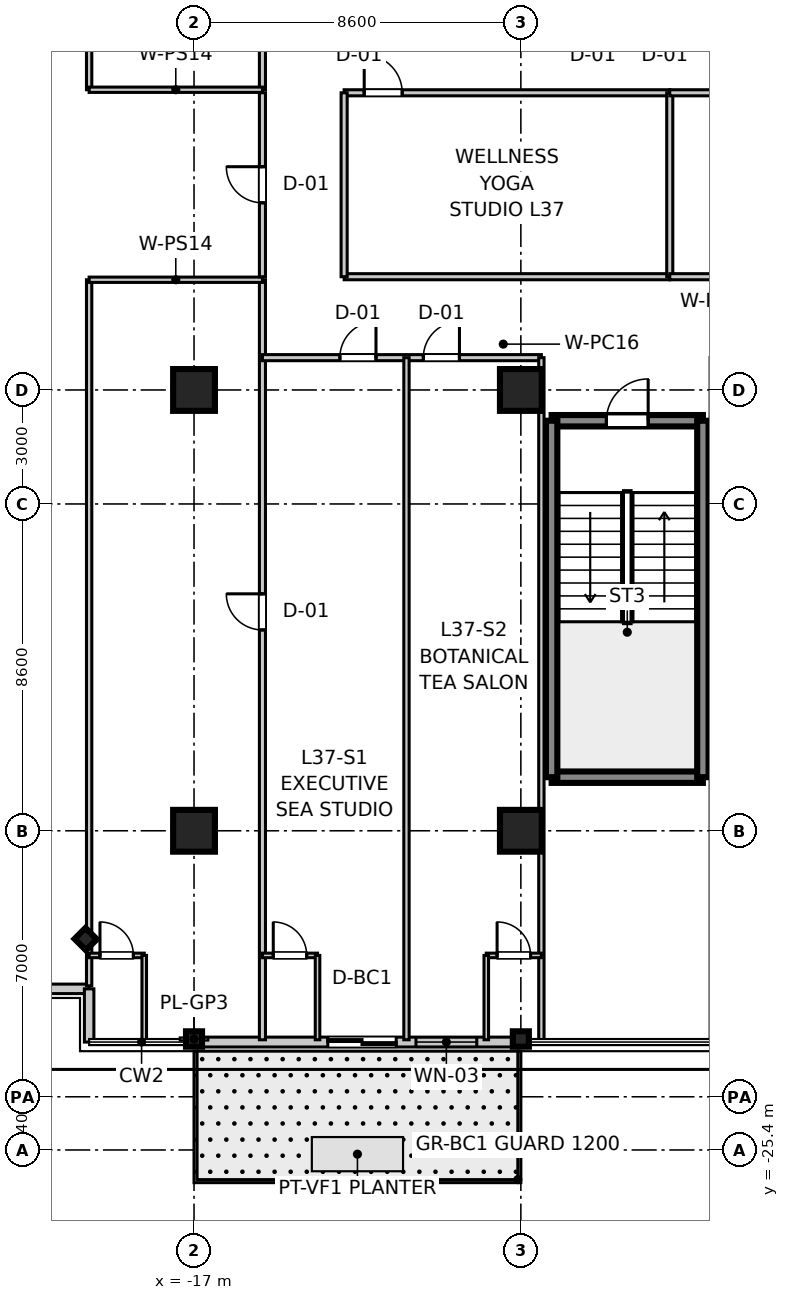
"""IFC4 building model, lengths in metres.
Left out: names, types, materials, properties, quantities, classifications, styles, units other than length and angle.
Written with IfcOpenShell. Run it as: python <this file> out.ifc"""

import sys

from ifc_helpers import new_model, si_unit, direction, frame, frame_2d, origin, origin_2d, place, context, subcontext, project, spatial, rectangle, i_section, extrude, source, transform, mapped, element, fill, save


model = new_model("IFC4")
c1 = context("Model", 3, precision=1e-05, world=origin(), true_north=direction((0.0, 1.0)))
c2 = subcontext(c1, "Body", "Model", "MODEL_VIEW")
j1 = project(units=[si_unit("LENGTHUNIT", "METRE"), si_unit("PLANEANGLEUNIT", "RADIAN")], contexts=[c1])
p1 = place(None, origin())
s1 = spatial("IfcSite", under=j1, at=p1, CompositionType="ELEMENT")
p2 = place(p1, origin())
s2 = spatial("IfcBuilding", under=s1, at=p2, CompositionType="ELEMENT")
p3 = place(p2, frame((0.0, 0.0, 149.0)))
s3 = spatial("IfcBuildingStorey", under=s2, at=p3, CompositionType="ELEMENT", Elevation=149.0)
m1 = source(origin(), c2, "Body", "SweptSolid", [
    extrude(rectangle(XDim=1.1, YDim=1.1, at=origin_2d()), origin(), (0.0, 0.0, 1.0), 3.605),
])
for number, where, z_axis, x_axis in (
    (1, (-17.0, -17.0, 0.0), (0.0, 0.0, 1.0), (1.0, 0.0, 0.0)),
    (2, (-17.0, -5.4, 0.0), (0.0, 0.0, 1.0), (1.0, 0.0, 0.0)),
    (3, (-8.4, -17.0, 0.0), (0.0, 0.0, 1.0), (1.0, 0.0, 0.0)),
    (4, (-8.4, -5.4, 0.0), (0.0, 0.0, 1.0), (1.0, 0.0, 0.0)),
):
    element("IfcColumn", number, at=place(p3, frame(where, z_axis=z_axis, x_axis=x_axis)), inside=s3, PredefinedType="COLUMN", context=c2, shape_type="MappedRepresentation", body=[
        mapped(m1, transform((0.0, 0.0, 0.0), scale=1.0)),
    ])
m2 = source(origin(), c2, "Body", "SweptSolid", [
    extrude(i_section(OverallWidth=0.406, OverallDepth=0.422, WebThickness=0.019, FlangeThickness=0.03, at=origin_2d()), origin(), (0.0, 0.0, 1.0), 3.605),
])
for number, where, z_axis, x_axis in (
    (5, (-17.0, -22.48, 0.0), (0.0, 0.0, 1.0), (0.0, 1.0, 0.0)),
    (6, (-8.4, -22.48, 0.0), (0.0, 0.0, 1.0), (0.0, 1.0, 0.0)),
    (7, (-19.85, -19.85, 0.0), (0.0, 0.0, 1.0), (0.707, 0.707, 0.0)),
):
    element("IfcColumn", number, at=place(p3, frame(where, z_axis=z_axis, x_axis=x_axis)), inside=s3, PredefinedType="COLUMN", context=c2, shape_type="MappedRepresentation", body=[
        mapped(m2, transform((0.0, 0.0, 0.0), scale=1.0)),
    ])
m3 = source(origin(), c2, "Body", "SweptSolid", [
    extrude(rectangle(XDim=3.98, YDim=0.3, at=frame_2d((1.99, 0.0))), origin(), (0.0, 0.0, 1.0), 3.39),
])
p4 = place(p3, frame((-7.59, -15.59, 0.0), z_axis=(0.0, 0.0, 1.0), x_axis=(1.0, 0.0, 0.0)))
e8 = element("IfcWall", 8, at=p4, inside=s3, PredefinedType="SHEAR", context=c2, shape_type="MappedRepresentation", body=[
    mapped(m3, transform((0.0, 0.0, 0.0), scale=1.0)),
])
p5 = place(p3, frame((-7.59, -6.21, 0.0), z_axis=(0.0, 0.0, 1.0), x_axis=(1.0, 0.0, 0.0)))
e9 = element("IfcWall", 9, at=p5, inside=s3, PredefinedType="SHEAR", context=c2, shape_type="MappedRepresentation", body=[
    mapped(m3, transform((0.0, 0.0, 0.0), scale=1.0)),
])
p6 = place(p5, frame((1.44, 0.0, 0.0)))
e10 = element("IfcOpeningElement", 10, at=p6, cuts=e9, PredefinedType="OPENING", context=c2, shape_type="SweptSolid", body=[
    extrude(rectangle(XDim=1.1, YDim=2.15, at=frame_2d((0.55, 1.075))), frame((0.0, 0.16, 0.0), z_axis=(0.0, -1.0, 0.0), x_axis=(1.0, 0.0, 0.0)), (0.0, 0.0, 1.0), 0.32),
])
m4 = source(origin(), c2, "Body", "SweptSolid", [
    extrude(rectangle(XDim=9.38, YDim=0.3, at=frame_2d((4.69, 0.0))), origin(), (0.0, 0.0, 1.0), 3.39),
])
for number, where, z_axis, x_axis in (
    (11, (-7.59, -15.59, 0.0), (0.0, 0.0, 1.0), (0.0, 1.0, 0.0)),
    (12, (-3.61, -15.59, 0.0), (0.0, 0.0, 1.0), (0.0, 1.0, 0.0)),
):
    element("IfcWall", number, at=place(p3, frame(where, z_axis=z_axis, x_axis=x_axis)), inside=s3, PredefinedType="SHEAR", context=c2, shape_type="MappedRepresentation", body=[
        mapped(m4, transform((0.0, 0.0, 0.0), scale=1.0)),
    ])
m5 = source(origin(), c2, "Body", "SweptSolid", [
    extrude(rectangle(XDim=1.4, YDim=0.25, at=frame_2d((0.7, 0.0))), origin(), (0.0, 0.0, 1.0), 3.39),
])
p7 = place(p3, frame((-21.16, -21.16, 0.0), z_axis=(0.0, 0.0, 1.0), x_axis=(1.0, 0.0, 0.0)))
e13 = element("IfcWall", 13, at=p7, inside=s3, PredefinedType="STANDARD", context=c2, shape_type="MappedRepresentation", body=[
    mapped(m5, transform((0.0, 0.0, 0.0), scale=1.0)),
])
m6 = source(origin(), c2, "Body", "SweptSolid", [
    extrude(rectangle(XDim=1.4, YDim=0.25, at=frame_2d((0.7, 0.0))), origin(), (0.0, 0.0, 1.0), 3.39),
])
p8 = place(p3, frame((-19.76, -22.56, 0.0), z_axis=(0.0, 0.0, 1.0), x_axis=(0.0, 1.0, 0.0)))
e14 = element("IfcWall", 14, at=p8, inside=s3, PredefinedType="STANDARD", context=c2, shape_type="MappedRepresentation", body=[
    mapped(m6, transform((0.0, 0.0, 0.0), scale=1.0)),
])
m7 = source(origin(), c2, "Body", "SweptSolid", [
    extrude(rectangle(XDim=8.6, YDim=0.26, at=frame_2d((4.3, 0.0))), origin(), (0.0, 0.0, 1.0), 2.87),
])
p9 = place(p3, frame((-17.0, -22.56, 0.0), z_axis=(0.0, 0.0, 1.0), x_axis=(1.0, 0.0, 0.0)))
e15 = element("IfcWall", 15, at=p9, inside=s3, PredefinedType="STANDARD", context=c2, shape_type="MappedRepresentation", body=[
    mapped(m7, transform((0.0, 0.0, 0.0), scale=1.0)),
])
p10 = place(p9, frame((3.52, 0.0, 0.0)))
e16 = element("IfcOpeningElement", 16, at=p10, cuts=e15, PredefinedType="OPENING", context=c2, shape_type="SweptSolid", body=[
    extrude(rectangle(XDim=1.8, YDim=2.25, at=frame_2d((0.9, 1.125))), frame((0.0, 0.14, 0.0), z_axis=(0.0, -1.0, 0.0), x_axis=(1.0, 0.0, 0.0)), (0.0, 0.0, 1.0), 0.28),
])
p11 = place(p9, frame((5.84, 0.0, 0.85)))
e17 = element("IfcOpeningElement", 17, at=p11, cuts=e15, PredefinedType="OPENING", context=c2, shape_type="SweptSolid", body=[
    extrude(rectangle(XDim=1.6, YDim=1.8, at=frame_2d((0.8, 0.9))), frame((0.0, 0.14, 0.0), z_axis=(0.0, -1.0, 0.0), x_axis=(1.0, 0.0, 0.0)), (0.0, 0.0, 1.0), 0.28),
])
m8 = source(origin(), c2, "Body", "SweptSolid", [
    extrude(rectangle(XDim=20.0, YDim=0.16, at=frame_2d((10.0, 0.0))), origin(), (0.0, 0.0, 1.0), 2.73),
])
p12 = place(p3, frame((-15.2, 2.5, 0.0), z_axis=(0.0, 0.0, 1.0), x_axis=(0.0, 1.0, 0.0)))
e18 = element("IfcWall", 18, at=p12, inside=s3, PredefinedType="PARTITIONING", context=c2, shape_type="MappedRepresentation", body=[
    mapped(m8, transform((0.0, 0.0, 0.0), scale=1.0)),
])
p13 = place(p12, frame((8.265, 0.0, 0.0)))
e19 = element("IfcOpeningElement", 19, at=p13, cuts=e18, PredefinedType="OPENING", context=c2, shape_type="SweptSolid", body=[
    extrude(rectangle(XDim=0.95, YDim=2.1, at=frame_2d((0.475, 1.05))), frame((0.0, 0.09, 0.0), z_axis=(0.0, -1.0, 0.0), x_axis=(1.0, 0.0, 0.0)), (0.0, 0.0, 1.0), 0.18),
])
m9 = source(origin(), c2, "Body", "SweptSolid", [
    extrude(rectangle(XDim=18.58, YDim=0.14, at=frame_2d((9.29, 0.0))), origin(), (0.0, 0.0, 1.0), 2.73),
])
p14 = place(p3, frame((-19.76, 2.5, 0.0), z_axis=(0.0, 0.0, 1.0), x_axis=(0.0, 1.0, 0.0)))
e20 = element("IfcWall", 20, at=p14, inside=s3, PredefinedType="PARTITIONING", context=c2, shape_type="MappedRepresentation", body=[
    mapped(m9, transform((0.0, 0.0, 0.0), scale=1.0)),
])
m10 = source(origin(), c2, "Body", "SweptSolid", [
    extrude(rectangle(XDim=4.56, YDim=0.14, at=frame_2d((2.28, 0.0))), origin(), (0.0, 0.0, 1.0), 2.73),
])
p15 = place(p3, frame((-19.76, 2.5, 0.0), z_axis=(0.0, 0.0, 1.0), x_axis=(1.0, 0.0, 0.0)))
e21 = element("IfcWall", 21, at=p15, inside=s3, PredefinedType="PARTITIONING", context=c2, shape_type="MappedRepresentation", body=[
    mapped(m10, transform((0.0, 0.0, 0.0), scale=1.0)),
])
p16 = place(p3, frame((-15.2, -22.5, 0.0), z_axis=(0.0, 0.0, 1.0), x_axis=(0.0, 1.0, 0.0)))
e22 = element("IfcWall", 22, at=p16, inside=s3, PredefinedType="PARTITIONING", context=c2, shape_type="MappedRepresentation", body=[
    mapped(m8, transform((0.0, 0.0, 0.0), scale=1.0)),
])
p17 = place(p16, frame((10.785, 0.0, 0.0)))
e23 = element("IfcOpeningElement", 23, at=p17, cuts=e22, PredefinedType="OPENING", context=c2, shape_type="SweptSolid", body=[
    extrude(rectangle(XDim=0.95, YDim=2.1, at=frame_2d((0.475, 1.05))), frame((0.0, 0.09, 0.0), z_axis=(0.0, -1.0, 0.0), x_axis=(1.0, 0.0, 0.0)), (0.0, 0.0, 1.0), 0.18),
])
p18 = place(p3, frame((-19.76, -21.08, 0.0), z_axis=(0.0, 0.0, 1.0), x_axis=(0.0, 1.0, 0.0)))
e24 = element("IfcWall", 24, at=p18, inside=s3, PredefinedType="PARTITIONING", context=c2, shape_type="MappedRepresentation", body=[
    mapped(m9, transform((0.0, 0.0, 0.0), scale=1.0)),
])
p19 = place(p3, frame((-19.76, -2.5, 0.0), z_axis=(0.0, 0.0, 1.0), x_axis=(1.0, 0.0, 0.0)))
e25 = element("IfcWall", 25, at=p19, inside=s3, PredefinedType="PARTITIONING", context=c2, shape_type="MappedRepresentation", body=[
    mapped(m10, transform((0.0, 0.0, 0.0), scale=1.0)),
])
m11 = source(origin(), c2, "Body", "SweptSolid", [
    extrude(rectangle(XDim=1.45, YDim=0.12, at=frame_2d((0.725, 0.0))), origin(), (0.0, 0.0, 1.0), 2.73),
])
p20 = place(p3, frame((-19.76, -20.28, 0.0), z_axis=(0.0, 0.0, 1.0), x_axis=(1.0, 0.0, 0.0)))
e26 = element("IfcWall", 26, at=p20, inside=s3, PredefinedType="PARTITIONING", context=c2, shape_type="MappedRepresentation", body=[
    mapped(m11, transform((0.0, 0.0, 0.0), scale=1.0)),
])
p21 = place(p20, frame((0.285, 0.0, 0.0)))
e27 = element("IfcOpeningElement", 27, at=p21, cuts=e26, PredefinedType="OPENING", context=c2, shape_type="SweptSolid", body=[
    extrude(rectangle(XDim=0.88, YDim=2.1, at=frame_2d((0.44, 1.05))), frame((0.0, 0.07, 0.0), z_axis=(0.0, -1.0, 0.0), x_axis=(1.0, 0.0, 0.0)), (0.0, 0.0, 1.0), 0.14),
])
m12 = source(origin(), c2, "Body", "SweptSolid", [
    extrude(rectangle(XDim=2.22, YDim=0.12, at=frame_2d((1.11, 0.0))), origin(), (0.0, 0.0, 1.0), 2.73),
])
p22 = place(p3, frame((-18.31, -22.5, 0.0), z_axis=(0.0, 0.0, 1.0), x_axis=(0.0, 1.0, 0.0)))
e28 = element("IfcWall", 28, at=p22, inside=s3, PredefinedType="PARTITIONING", context=c2, shape_type="MappedRepresentation", body=[
    mapped(m12, transform((0.0, 0.0, 0.0), scale=1.0)),
])
m13 = source(origin(), c2, "Body", "SweptSolid", [
    extrude(rectangle(XDim=7.34, YDim=0.16, at=frame_2d((3.67, 0.0))), origin(), (0.0, 0.0, 1.0), 2.73),
])
p23 = place(p3, frame((-15.2, -4.55, 0.0), z_axis=(0.0, 0.0, 1.0), x_axis=(1.0, 0.0, 0.0)))
e29 = element("IfcWall", 29, at=p23, inside=s3, PredefinedType="PARTITIONING", context=c2, shape_type="MappedRepresentation", body=[
    mapped(m13, transform((0.0, 0.0, 0.0), scale=1.0)),
])
p24 = place(p23, frame((2.038, 0.0, 0.0)))
e30 = element("IfcOpeningElement", 30, at=p24, cuts=e29, PredefinedType="OPENING", context=c2, shape_type="SweptSolid", body=[
    extrude(rectangle(XDim=0.95, YDim=2.1, at=frame_2d((0.475, 1.05))), frame((0.0, 0.09, 0.0), z_axis=(0.0, -1.0, 0.0), x_axis=(1.0, 0.0, 0.0)), (0.0, 0.0, 1.0), 0.18),
])
p25 = place(p23, frame((4.234, 0.0, 0.0)))
e31 = element("IfcOpeningElement", 31, at=p25, cuts=e29, PredefinedType="OPENING", context=c2, shape_type="SweptSolid", body=[
    extrude(rectangle(XDim=0.95, YDim=2.1, at=frame_2d((0.475, 1.05))), frame((0.0, 0.09, 0.0), z_axis=(0.0, -1.0, 0.0), x_axis=(1.0, 0.0, 0.0)), (0.0, 0.0, 1.0), 0.18),
])
m14 = source(origin(), c2, "Body", "SweptSolid", [
    extrude(rectangle(XDim=17.95, YDim=0.14, at=frame_2d((8.975, 0.0))), origin(), (0.0, 0.0, 1.0), 2.73),
])
p26 = place(p3, frame((-7.86, -22.5, 0.0), z_axis=(0.0, 0.0, 1.0), x_axis=(0.0, 1.0, 0.0)))
e32 = element("IfcWall", 32, at=p26, inside=s3, PredefinedType="PARTITIONING", context=c2, shape_type="MappedRepresentation", body=[
    mapped(m14, transform((0.0, 0.0, 0.0), scale=1.0)),
])
p27 = place(p3, frame((-15.2, -20.28, 0.0), z_axis=(0.0, 0.0, 1.0), x_axis=(1.0, 0.0, 0.0)))
e33 = element("IfcWall", 33, at=p27, inside=s3, PredefinedType="PARTITIONING", context=c2, shape_type="MappedRepresentation", body=[
    mapped(m11, transform((0.0, 0.0, 0.0), scale=1.0)),
])
p28 = place(p27, frame((0.285, 0.0, 0.0)))
e34 = element("IfcOpeningElement", 34, at=p28, cuts=e33, PredefinedType="OPENING", context=c2, shape_type="SweptSolid", body=[
    extrude(rectangle(XDim=0.88, YDim=2.1, at=frame_2d((0.44, 1.05))), frame((0.0, 0.07, 0.0), z_axis=(0.0, -1.0, 0.0), x_axis=(1.0, 0.0, 0.0)), (0.0, 0.0, 1.0), 0.14),
])
p29 = place(p3, frame((-13.75, -22.5, 0.0), z_axis=(0.0, 0.0, 1.0), x_axis=(0.0, 1.0, 0.0)))
e35 = element("IfcWall", 35, at=p29, inside=s3, PredefinedType="PARTITIONING", context=c2, shape_type="MappedRepresentation", body=[
    mapped(m12, transform((0.0, 0.0, 0.0), scale=1.0)),
])
p30 = place(p3, frame((-11.41, -22.5, 0.0), z_axis=(0.0, 0.0, 1.0), x_axis=(0.0, 1.0, 0.0)))
e36 = element("IfcWall", 36, at=p30, inside=s3, PredefinedType="PARTITIONING", context=c2, shape_type="MappedRepresentation", body=[
    mapped(m14, transform((0.0, 0.0, 0.0), scale=1.0)),
])
p31 = place(p3, frame((-9.31, -20.28, 0.0), z_axis=(0.0, 0.0, 1.0), x_axis=(1.0, 0.0, 0.0)))
e37 = element("IfcWall", 37, at=p31, inside=s3, PredefinedType="PARTITIONING", context=c2, shape_type="MappedRepresentation", body=[
    mapped(m11, transform((0.0, 0.0, 0.0), scale=1.0)),
])
p32 = place(p31, frame((0.285, 0.0, 0.0)))
e38 = element("IfcOpeningElement", 38, at=p32, cuts=e37, PredefinedType="OPENING", context=c2, shape_type="SweptSolid", body=[
    extrude(rectangle(XDim=0.88, YDim=2.1, at=frame_2d((0.44, 1.05))), frame((0.0, 0.07, 0.0), z_axis=(0.0, -1.0, 0.0), x_axis=(1.0, 0.0, 0.0)), (0.0, 0.0, 1.0), 0.14),
])
p33 = place(p3, frame((-9.31, -22.5, 0.0), z_axis=(0.0, 0.0, 1.0), x_axis=(0.0, 1.0, 0.0)))
e39 = element("IfcWall", 39, at=p33, inside=s3, PredefinedType="PARTITIONING", context=c2, shape_type="MappedRepresentation", body=[
    mapped(m12, transform((0.0, 0.0, 0.0), scale=1.0)),
])
m15 = source(origin(), c2, "Body", "SweptSolid", [
    extrude(rectangle(XDim=4.84, YDim=0.16, at=frame_2d((2.42, 0.0))), origin(), (0.0, 0.0, 1.0), 2.73),
])
p34 = place(p3, frame((-15.2, -2.42, 0.0), z_axis=(0.0, 0.0, 1.0), x_axis=(0.0, 1.0, 0.0)))
e40 = element("IfcWall", 40, at=p34, inside=s3, PredefinedType="PARTITIONING", context=c2, shape_type="MappedRepresentation", body=[
    mapped(m15, transform((0.0, 0.0, 0.0), scale=1.0)),
])
p35 = place(p34, frame((1.945, 0.0, 0.0)))
e41 = element("IfcOpeningElement", 41, at=p35, cuts=e40, PredefinedType="OPENING", context=c2, shape_type="SweptSolid", body=[
    extrude(rectangle(XDim=0.95, YDim=2.1, at=frame_2d((0.475, 1.05))), frame((0.0, 0.09, 0.0), z_axis=(0.0, -1.0, 0.0), x_axis=(1.0, 0.0, 0.0)), (0.0, 0.0, 1.0), 0.18),
])
m16 = source(origin(), c2, "Body", "SweptSolid", [
    extrude(rectangle(XDim=8.568, YDim=0.16, at=frame_2d((4.284, 0.0))), origin(), (0.0, 0.0, 1.0), 2.73),
])
p36 = place(p3, frame((-13.05, -2.42, 0.0), z_axis=(0.0, 0.0, 1.0), x_axis=(1.0, 0.0, 0.0)))
e42 = element("IfcWall", 42, at=p36, inside=s3, PredefinedType="PARTITIONING", context=c2, shape_type="MappedRepresentation", body=[
    mapped(m16, transform((0.0, 0.0, 0.0), scale=1.0)),
])
p37 = place(p3, frame((-13.05, 2.42, 0.0), z_axis=(0.0, 0.0, 1.0), x_axis=(1.0, 0.0, 0.0)))
e43 = element("IfcWall", 43, at=p37, inside=s3, PredefinedType="PARTITIONING", context=c2, shape_type="MappedRepresentation", body=[
    mapped(m16, transform((0.0, 0.0, 0.0), scale=1.0)),
])
p38 = place(p37, frame((0.528, 0.0, 0.0)))
e44 = element("IfcOpeningElement", 44, at=p38, cuts=e43, PredefinedType="OPENING", context=c2, shape_type="SweptSolid", body=[
    extrude(rectangle(XDim=1.0, YDim=2.1, at=frame_2d((0.5, 1.05))), frame((0.0, 0.09, 0.0), z_axis=(0.0, -1.0, 0.0), x_axis=(1.0, 0.0, 0.0)), (0.0, 0.0, 1.0), 0.18),
])
for number, where, z_axis, x_axis in (
    (45, (-13.05, -2.42, 0.0), (0.0, 0.0, 1.0), (0.0, 1.0, 0.0)),
    (46, (-4.482, -2.42, 0.0), (0.0, 0.0, 1.0), (0.0, 1.0, 0.0)),
):
    element("IfcWall", number, at=place(p3, frame(where, z_axis=z_axis, x_axis=x_axis)), inside=s3, PredefinedType="PARTITIONING", context=c2, shape_type="MappedRepresentation", body=[
        mapped(m15, transform((0.0, 0.0, 0.0), scale=1.0)),
    ])
m17 = source(origin(), c2, "Body", "SweptSolid", [
    extrude(rectangle(XDim=11.832, YDim=0.16, at=frame_2d((5.916, 0.0))), origin(), (0.0, 0.0, 1.0), 2.73),
])
p39 = place(p3, frame((-4.482, -2.42, 0.0), z_axis=(0.0, 0.0, 1.0), x_axis=(1.0, 0.0, 0.0)))
e47 = element("IfcWall", 47, at=p39, inside=s3, PredefinedType="PARTITIONING", context=c2, shape_type="MappedRepresentation", body=[
    mapped(m17, transform((0.0, 0.0, 0.0), scale=1.0)),
])
p40 = place(p39, frame((3.852, 0.0, 0.0)))
e48 = element("IfcOpeningElement", 48, at=p40, cuts=e47, PredefinedType="OPENING", context=c2, shape_type="SweptSolid", body=[
    extrude(rectangle(XDim=1.5, YDim=2.15, at=frame_2d((0.75, 1.075))), frame((0.0, 0.09, 0.0), z_axis=(0.0, -1.0, 0.0), x_axis=(1.0, 0.0, 0.0)), (0.0, 0.0, 1.0), 0.18),
])
p41 = place(p3, frame((-4.482, 2.42, 0.0), z_axis=(0.0, 0.0, 1.0), x_axis=(1.0, 0.0, 0.0)))
e49 = element("IfcWall", 49, at=p41, inside=s3, PredefinedType="PARTITIONING", context=c2, shape_type="MappedRepresentation", body=[
    mapped(m17, transform((0.0, 0.0, 0.0), scale=1.0)),
])
m18 = source(origin(), c2, "Body", "SweptSolid", [
    extrude(rectangle(XDim=1.1, YDim=2.15, at=frame_2d((0.55, 1.075))), frame((0.0, 0.025, 0.0), z_axis=(0.0, -1.0, 0.0), x_axis=(1.0, 0.0, 0.0)), (0.0, 0.0, 1.0), 0.05),
])
p42 = place(p6, frame((1.1, 0.0, 0.0), z_axis=(0.0, 0.0, 1.0), x_axis=(-1.0, 0.0, 0.0)))
e50 = element("IfcDoor", 50, at=p42, inside=s3, OperationType="SINGLE_SWING_RIGHT", PredefinedType="DOOR", context=c2, shape_type="MappedRepresentation", body=[
    mapped(m18, transform((0.0, 0.0, 0.0), scale=1.0)),
])
fill(e10, e50)
m19 = source(origin(), c2, "Body", "SweptSolid", [
    extrude(rectangle(XDim=0.88, YDim=2.1, at=frame_2d((0.44, 1.05))), frame((0.0, 0.025, 0.0), z_axis=(0.0, -1.0, 0.0), x_axis=(1.0, 0.0, 0.0)), (0.0, 0.0, 1.0), 0.05),
])
p43 = place(p21, frame((0.88, 0.0, 0.0), z_axis=(0.0, 0.0, 1.0), x_axis=(-1.0, 0.0, 0.0)))
e51 = element("IfcDoor", 51, at=p43, inside=s3, OperationType="SINGLE_SWING_LEFT", PredefinedType="DOOR", context=c2, shape_type="MappedRepresentation", body=[
    mapped(m19, transform((0.0, 0.0, 0.0), scale=1.0)),
])
fill(e27, e51)
m20 = source(origin(), c2, "Body", "SweptSolid", [
    extrude(rectangle(XDim=0.95, YDim=2.1, at=frame_2d((0.475, 1.05))), frame((0.0, 0.025, 0.0), z_axis=(0.0, -1.0, 0.0), x_axis=(1.0, 0.0, 0.0)), (0.0, 0.0, 1.0), 0.05),
])
p44 = place(p17, origin())
e52 = element("IfcDoor", 52, at=p44, inside=s3, OperationType="SINGLE_SWING_RIGHT", PredefinedType="DOOR", context=c2, shape_type="MappedRepresentation", body=[
    mapped(m20, transform((0.0, 0.0, 0.0), scale=1.0)),
])
fill(e23, e52)
p45 = place(p28, frame((0.88, 0.0, 0.0), z_axis=(0.0, 0.0, 1.0), x_axis=(-1.0, 0.0, 0.0)))
e53 = element("IfcDoor", 53, at=p45, inside=s3, OperationType="SINGLE_SWING_LEFT", PredefinedType="DOOR", context=c2, shape_type="MappedRepresentation", body=[
    mapped(m19, transform((0.0, 0.0, 0.0), scale=1.0)),
])
fill(e34, e53)
p46 = place(p24, frame((0.95, 0.0, 0.0), z_axis=(0.0, 0.0, 1.0), x_axis=(-1.0, 0.0, 0.0)))
e54 = element("IfcDoor", 54, at=p46, inside=s3, OperationType="SINGLE_SWING_RIGHT", PredefinedType="DOOR", context=c2, shape_type="MappedRepresentation", body=[
    mapped(m20, transform((0.0, 0.0, 0.0), scale=1.0)),
])
fill(e30, e54)
p47 = place(p32, frame((0.88, 0.0, 0.0), z_axis=(0.0, 0.0, 1.0), x_axis=(-1.0, 0.0, 0.0)))
e55 = element("IfcDoor", 55, at=p47, inside=s3, OperationType="SINGLE_SWING_LEFT", PredefinedType="DOOR", context=c2, shape_type="MappedRepresentation", body=[
    mapped(m19, transform((0.0, 0.0, 0.0), scale=1.0)),
])
fill(e38, e55)
p48 = place(p25, frame((0.95, 0.0, 0.0), z_axis=(0.0, 0.0, 1.0), x_axis=(-1.0, 0.0, 0.0)))
e56 = element("IfcDoor", 56, at=p48, inside=s3, OperationType="SINGLE_SWING_RIGHT", PredefinedType="DOOR", context=c2, shape_type="MappedRepresentation", body=[
    mapped(m20, transform((0.0, 0.0, 0.0), scale=1.0)),
])
fill(e31, e56)
p49 = place(p35, origin())
e57 = element("IfcDoor", 57, at=p49, inside=s3, OperationType="SINGLE_SWING_RIGHT", PredefinedType="DOOR", context=c2, shape_type="MappedRepresentation", body=[
    mapped(m20, transform((0.0, 0.0, 0.0), scale=1.0)),
])
fill(e41, e57)
m21 = source(origin(), c2, "Body", "SweptSolid", [
    extrude(rectangle(XDim=1.0, YDim=2.1, at=frame_2d((0.5, 1.05))), frame((0.0, 0.025, 0.0), z_axis=(0.0, -1.0, 0.0), x_axis=(1.0, 0.0, 0.0)), (0.0, 0.0, 1.0), 0.05),
])
p50 = place(p38, frame((1.0, 0.0, 0.0), z_axis=(0.0, 0.0, 1.0), x_axis=(-1.0, 0.0, 0.0)))
e58 = element("IfcDoor", 58, at=p50, inside=s3, OperationType="SINGLE_SWING_LEFT", PredefinedType="DOOR", context=c2, shape_type="MappedRepresentation", body=[
    mapped(m21, transform((0.0, 0.0, 0.0), scale=1.0)),
])
fill(e44, e58)
m22 = source(origin(), c2, "Body", "SweptSolid", [
    extrude(rectangle(XDim=1.8, YDim=2.25, at=frame_2d((0.9, 1.125))), frame((0.0, 0.025, 0.0), z_axis=(0.0, -1.0, 0.0), x_axis=(1.0, 0.0, 0.0)), (0.0, 0.0, 1.0), 0.05),
])
p51 = place(p10, frame((1.8, 0.0, 0.0), z_axis=(0.0, 0.0, 1.0), x_axis=(-1.0, 0.0, 0.0)))
e59 = element("IfcDoor", 59, at=p51, inside=s3, OperationType="DOUBLE_DOOR_SLIDING", PredefinedType="DOOR", context=c2, shape_type="MappedRepresentation", body=[
    mapped(m22, transform((0.0, 0.0, 0.0), scale=1.0)),
])
fill(e16, e59)
m23 = source(origin(), c2, "Body", "SweptSolid", [
    extrude(rectangle(XDim=1.6, YDim=1.8, at=frame_2d((0.8, 0.9))), frame((0.0, 0.03, 0.0), z_axis=(0.0, -1.0, 0.0), x_axis=(1.0, 0.0, 0.0)), (0.0, 0.0, 1.0), 0.06),
])
p52 = place(p11, origin())
e60 = element("IfcWindow", 60, at=p52, inside=s3, PartitioningType="SINGLE_PANEL", PredefinedType="WINDOW", context=c2, shape_type="MappedRepresentation", body=[
    mapped(m23, transform((0.0, 0.0, 0.0), scale=1.0)),
])
fill(e17, e60)
save(model, sys.argv[1])
